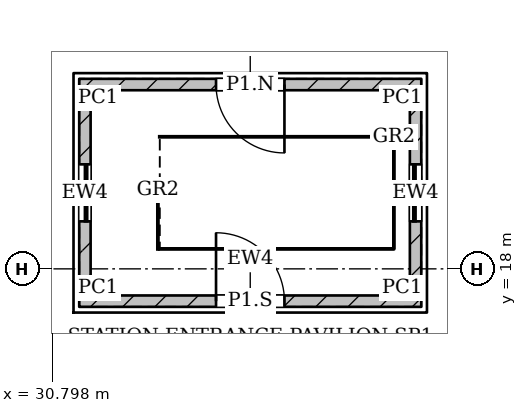
"""IFC4 building model, lengths in metres.
Left out: names, types, materials, properties, quantities, classifications, styles, units other than length and angle.
Written with IfcOpenShell. Run it as: python <this file> out.ifc"""

import sys

from ifc_helpers import new_model, si_unit, direction, frame, frame_2d, origin, origin_2d, place, context, subcontext, project, spatial, rectangle, extrude, element, fill, save


model = new_model("IFC4")
c1 = context("Model", 3, precision=1e-05, world=origin(), true_north=direction((0.0, 1.0)))
c2 = subcontext(c1, "Body", "Model", "MODEL_VIEW")
j1 = project(units=[si_unit("LENGTHUNIT", "METRE"), si_unit("PLANEANGLEUNIT", "RADIAN")], contexts=[c1])
p1 = place(None, origin())
s1 = spatial("IfcSite", under=j1, at=p1, CompositionType="ELEMENT")
p2 = place(p1, origin())
s2 = spatial("IfcBuilding", under=s1, at=p2, CompositionType="ELEMENT")
p3 = place(p2, origin())
s3 = spatial("IfcBuildingStorey", under=s2, at=p3, CompositionType="ELEMENT", Elevation=0.0)
p4 = place(p3, frame((31.5, 17.15, 0.0), z_axis=(0.0, 0.0, 1.0), x_axis=(1.0, 0.0, 0.0)))
e1 = element("IfcWall", 1, at=p4, inside=s3, PredefinedType="SOLIDWALL", context=c2, shape_type="SweptSolid", body=[
    extrude(rectangle(XDim=9.0, YDim=0.3, at=frame_2d((4.5, 0.0))), origin(), (0.0, 0.0, 1.0), 4.2),
])
p5 = place(p4, frame((3.6, 0.0, 0.0)))
e2 = element("IfcOpeningElement", 2, at=p5, cuts=e1, PredefinedType="OPENING", context=c2, shape_type="SweptSolid", body=[
    extrude(rectangle(XDim=1.8, YDim=2.4, at=frame_2d((0.9, 1.2))), frame((0.0, 0.16, 0.0), z_axis=(0.0, -1.0, 0.0), x_axis=(1.0, 0.0, 0.0)), (0.0, 0.0, 1.0), 0.32),
])
p6 = place(p3, frame((40.35, 17.3, 0.0), z_axis=(0.0, 0.0, 1.0), x_axis=(0.0, 1.0, 0.0)))
e3 = element("IfcWall", 3, at=p6, inside=s3, PredefinedType="SOLIDWALL", context=c2, shape_type="SweptSolid", body=[
    extrude(rectangle(XDim=5.4, YDim=0.3, at=frame_2d((2.7, 0.0))), origin(), (0.0, 0.0, 1.0), 4.2),
])
p7 = place(p6, frame((1.95, 0.0, 0.9)))
e4 = element("IfcOpeningElement", 4, at=p7, cuts=e3, PredefinedType="OPENING", context=c2, shape_type="SweptSolid", body=[
    extrude(rectangle(XDim=1.5, YDim=1.8, at=frame_2d((0.75, 0.9))), frame((0.0, 0.16, 0.0), z_axis=(0.0, -1.0, 0.0), x_axis=(1.0, 0.0, 0.0)), (0.0, 0.0, 1.0), 0.32),
])
p8 = place(p3, frame((40.5, 22.85, 0.0), z_axis=(0.0, 0.0, 1.0), x_axis=(-1.0, 0.0, 0.0)))
e5 = element("IfcWall", 5, at=p8, inside=s3, PredefinedType="SOLIDWALL", context=c2, shape_type="SweptSolid", body=[
    extrude(rectangle(XDim=9.0, YDim=0.3, at=frame_2d((4.5, 0.0))), origin(), (0.0, 0.0, 1.0), 4.2),
])
p9 = place(p8, frame((3.6, 0.0, 0.0)))
e6 = element("IfcOpeningElement", 6, at=p9, cuts=e5, PredefinedType="OPENING", context=c2, shape_type="SweptSolid", body=[
    extrude(rectangle(XDim=1.8, YDim=2.4, at=frame_2d((0.9, 1.2))), frame((0.0, 0.16, 0.0), z_axis=(0.0, -1.0, 0.0), x_axis=(1.0, 0.0, 0.0)), (0.0, 0.0, 1.0), 0.32),
])
p10 = place(p3, frame((31.65, 22.7, 0.0), z_axis=(0.0, 0.0, 1.0), x_axis=(0.0, -1.0, 0.0)))
e7 = element("IfcWall", 7, at=p10, inside=s3, PredefinedType="SOLIDWALL", context=c2, shape_type="SweptSolid", body=[
    extrude(rectangle(XDim=5.4, YDim=0.3, at=frame_2d((2.7, 0.0))), origin(), (0.0, 0.0, 1.0), 4.2),
])
p11 = place(p10, frame((1.95, 0.0, 0.9)))
e8 = element("IfcOpeningElement", 8, at=p11, cuts=e7, PredefinedType="OPENING", context=c2, shape_type="SweptSolid", body=[
    extrude(rectangle(XDim=1.5, YDim=1.8, at=frame_2d((0.75, 0.9))), frame((0.0, 0.16, 0.0), z_axis=(0.0, -1.0, 0.0), x_axis=(1.0, 0.0, 0.0)), (0.0, 0.0, 1.0), 0.32),
])
for number, where, z_axis, x_axis in (
    (9, (32.0, 17.5, 0.0), (0.0, 0.0, 1.0), (1.0, 0.0, 0.0)),
    (10, (40.0, 17.5, 0.0), (0.0, 0.0, 1.0), (1.0, 0.0, 0.0)),
    (11, (40.0, 22.5, 0.0), (0.0, 0.0, 1.0), (1.0, 0.0, 0.0)),
    (12, (32.0, 22.5, 0.0), (0.0, 0.0, 1.0), (1.0, 0.0, 0.0)),
):
    element("IfcColumn", number, at=place(p3, frame(where, z_axis=z_axis, x_axis=x_axis)), inside=s3, PredefinedType="COLUMN", context=c2, shape_type="SweptSolid", body=[
        extrude(rectangle(XDim=0.4, YDim=0.4, at=origin_2d()), origin(), (0.0, 0.0, 1.0), 4.2),
    ])
p12 = place(p5, origin())
e13 = element("IfcDoor", 13, at=p12, inside=s3, OperationType="DOUBLE_DOOR_DOUBLE_SWING", PredefinedType="DOOR", context=c2, shape_type="SweptSolid", body=[
    extrude(rectangle(XDim=1.8, YDim=2.4, at=frame_2d((0.9, 1.2))), frame((0.0, 0.025, 0.0), z_axis=(0.0, -1.0, 0.0), x_axis=(1.0, 0.0, 0.0)), (0.0, 0.0, 1.0), 0.05),
])
fill(e2, e13)
p13 = place(p7, origin())
e14 = element("IfcWindow", 14, at=p13, inside=s3, PartitioningType="SINGLE_PANEL", PredefinedType="WINDOW", context=c2, shape_type="SweptSolid", body=[
    extrude(rectangle(XDim=1.5, YDim=1.8, at=frame_2d((0.75, 0.9))), frame((0.0, 0.06, 0.0), z_axis=(0.0, -1.0, 0.0), x_axis=(1.0, 0.0, 0.0)), (0.0, 0.0, 1.0), 0.06),
])
fill(e4, e14)
p14 = place(p9, origin())
e15 = element("IfcDoor", 15, at=p14, inside=s3, OperationType="DOUBLE_DOOR_DOUBLE_SWING", PredefinedType="DOOR", context=c2, shape_type="SweptSolid", body=[
    extrude(rectangle(XDim=1.8, YDim=2.4, at=frame_2d((0.9, 1.2))), frame((0.0, 0.025, 0.0), z_axis=(0.0, -1.0, 0.0), x_axis=(1.0, 0.0, 0.0)), (0.0, 0.0, 1.0), 0.05),
])
fill(e6, e15)
p15 = place(p11, origin())
e16 = element("IfcWindow", 16, at=p15, inside=s3, PartitioningType="SINGLE_PANEL", PredefinedType="WINDOW", context=c2, shape_type="SweptSolid", body=[
    extrude(rectangle(XDim=1.5, YDim=1.8, at=frame_2d((0.75, 0.9))), frame((0.0, 0.06, 0.0), z_axis=(0.0, -1.0, 0.0), x_axis=(1.0, 0.0, 0.0)), (0.0, 0.0, 1.0), 0.06),
])
fill(e8, e16)
save(model, sys.argv[1])
